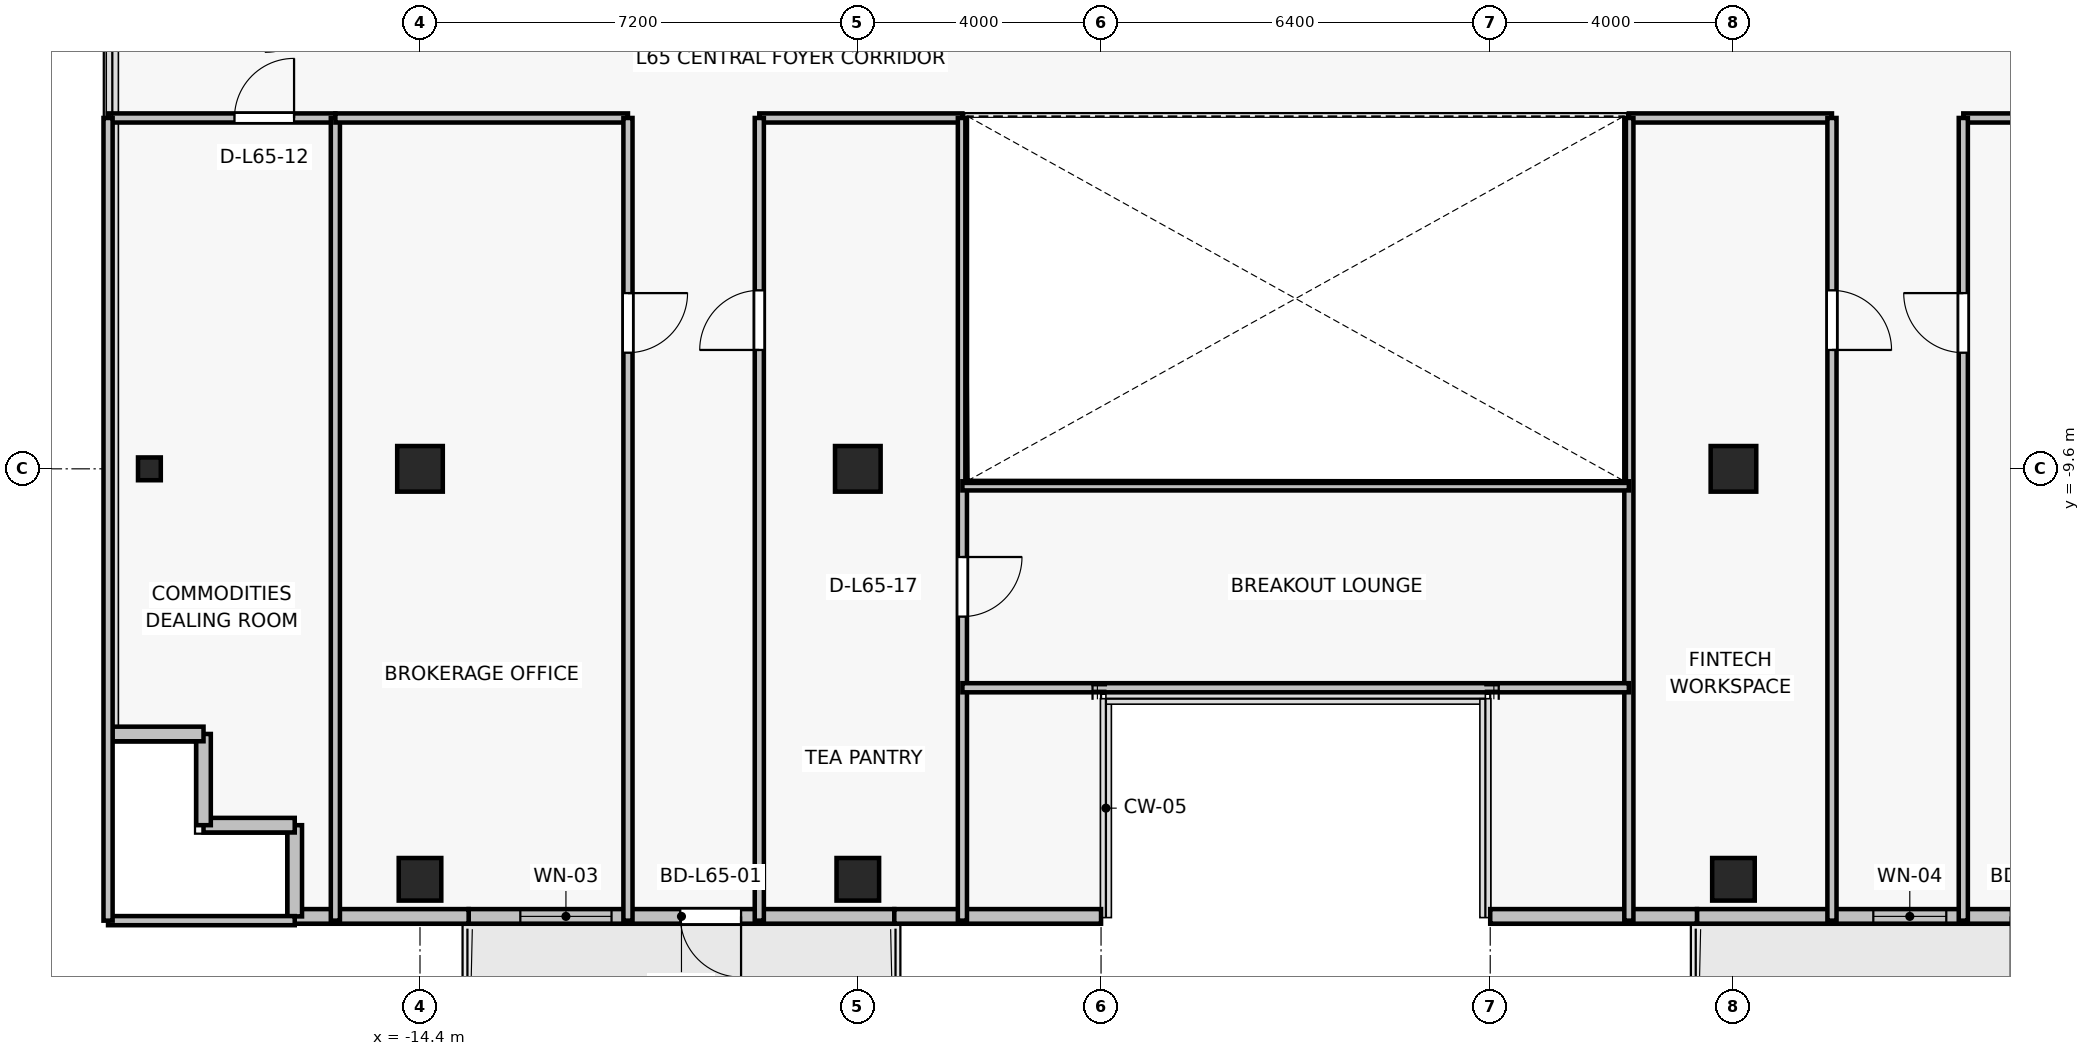
"""IFC4 building model, lengths in metres.
Left out: names, types, materials, properties, quantities, classifications, styles, units other than length and angle.
Written with IfcOpenShell. Run it as: python <this file> out.ifc"""

import sys

from ifc_helpers import new_model, si_unit, direction, frame, frame_2d, origin, origin_2d, place, context, subcontext, project, spatial, rectangle, i_section, extrude, source, transform, mapped, element, fill, save


model = new_model("IFC4")
c1 = context("Model", 3, precision=1e-05, world=origin(), true_north=direction((0.0, 1.0)))
c2 = subcontext(c1, "Body", "Model", "MODEL_VIEW")
j1 = project(units=[si_unit("LENGTHUNIT", "METRE"), si_unit("PLANEANGLEUNIT", "RADIAN")], contexts=[c1])
p1 = place(None, origin())
s1 = spatial("IfcSite", under=j1, at=p1, CompositionType="ELEMENT")
p2 = place(p1, origin())
s2 = spatial("IfcBuilding", under=s1, at=p2, CompositionType="ELEMENT")
p3 = place(p2, frame((0.0, 0.0, 232.0)))
s3 = spatial("IfcBuildingStorey", under=s2, at=p3, CompositionType="ELEMENT", Elevation=232.0)
for number, where, z_axis, x_axis in (
    (1, (-14.4, -9.6, 0.0), (0.0, 0.0, 1.0), (1.0, 0.0, 0.0)),
    (2, (-7.2, -9.6, 0.0), (0.0, 0.0, 1.0), (1.0, 0.0, 0.0)),
    (3, (7.2, -9.6, 0.0), (0.0, 0.0, 1.0), (1.0, 0.0, 0.0)),
):
    element("IfcColumn", number, at=place(p3, frame(where, z_axis=z_axis, x_axis=x_axis)), inside=s3, PredefinedType="COLUMN", context=c2, shape_type="SweptSolid", body=[
        extrude(rectangle(XDim=0.75, YDim=0.75, at=origin_2d()), origin(), (0.0, 0.0, 1.0), 3.3),
    ])
for number, where, z_axis, x_axis in (
    (4, (-14.4, -16.35, 0.0), (0.0, 0.0, 1.0), (1.0, 0.0, 0.0)),
    (5, (-7.2, -16.35, 0.0), (0.0, 0.0, 1.0), (1.0, 0.0, 0.0)),
    (6, (7.2, -16.35, 0.0), (0.0, 0.0, 1.0), (1.0, 0.0, 0.0)),
):
    element("IfcColumn", number, at=place(p3, frame(where, z_axis=z_axis, x_axis=x_axis)), inside=s3, PredefinedType="COLUMN", context=c2, shape_type="SweptSolid", body=[
        extrude(rectangle(XDim=0.7, YDim=0.7, at=origin_2d()), origin(), (0.0, 0.0, 1.0), 3.3),
    ])
p4 = place(p3, frame((-18.85, -9.6, 0.0), z_axis=(0.0, 0.0, 1.0), x_axis=(1.0, 0.0, 0.0)))
e7 = element("IfcColumn", 7, at=p4, inside=s3, PredefinedType="COLUMN", context=c2, shape_type="SweptSolid", body=[
    extrude(i_section(OverallWidth=0.375, OverallDepth=0.375, WebThickness=0.017, FlangeThickness=0.027, FilletRadius=0.015, at=origin_2d()), origin(), (0.0, 0.0, 1.0), 3.3),
])
p5 = place(p3, frame((-6.6, -16.96, 0.0), z_axis=(0.0, 0.0, 1.0), x_axis=(-1.0, 0.0, 0.0)))
e8 = element("IfcWall", 8, at=p5, inside=s3, PredefinedType="SOLIDWALL", context=c2, shape_type="SweptSolid", body=[
    extrude(rectangle(XDim=7.0, YDim=0.24, at=frame_2d((3.5, 0.0))), origin(), (0.0, 0.0, 1.0), 2.665),
])
p6 = place(p5, frame((2.52, 0.0, 0.0)))
e9 = element("IfcOpeningElement", 9, at=p6, cuts=e8, PredefinedType="OPENING", context=c2, shape_type="SweptSolid", body=[
    extrude(rectangle(XDim=1.0, YDim=2.2, at=frame_2d((0.5, 1.1))), frame((0.0, 0.13, 0.0), z_axis=(0.0, -1.0, 0.0), x_axis=(1.0, 0.0, 0.0)), (0.0, 0.0, 1.0), 0.26),
])
p7 = place(p5, frame((4.65, 0.0, 0.85)))
e10 = element("IfcOpeningElement", 10, at=p7, cuts=e8, PredefinedType="OPENING", context=c2, shape_type="SweptSolid", body=[
    extrude(rectangle(XDim=1.5, YDim=1.6, at=frame_2d((0.75, 0.8))), frame((0.0, 0.13, 0.0), z_axis=(0.0, -1.0, 0.0), x_axis=(1.0, 0.0, 0.0)), (0.0, 0.0, 1.0), 0.26),
])
p8 = place(p3, frame((13.6, -16.96, 0.0), z_axis=(0.0, 0.0, 1.0), x_axis=(-1.0, 0.0, 0.0)))
e11 = element("IfcWall", 11, at=p8, inside=s3, PredefinedType="SOLIDWALL", context=c2, shape_type="SweptSolid", body=[
    extrude(rectangle(XDim=7.0, YDim=0.24, at=frame_2d((3.5, 0.0))), origin(), (0.0, 0.0, 1.0), 2.665),
])
p9 = place(p8, frame((0.84, 0.0, 0.0)))
e12 = element("IfcOpeningElement", 12, at=p9, cuts=e11, PredefinedType="OPENING", context=c2, shape_type="SweptSolid", body=[
    extrude(rectangle(XDim=1.0, YDim=2.2, at=frame_2d((0.5, 1.1))), frame((0.0, 0.13, 0.0), z_axis=(0.0, -1.0, 0.0), x_axis=(1.0, 0.0, 0.0)), (0.0, 0.0, 1.0), 0.26),
])
p10 = place(p8, frame((2.9, 0.0, 0.85)))
e13 = element("IfcOpeningElement", 13, at=p10, cuts=e11, PredefinedType="OPENING", context=c2, shape_type="SweptSolid", body=[
    extrude(rectangle(XDim=1.2, YDim=1.5, at=frame_2d((0.6, 0.75))), frame((0.0, 0.13, 0.0), z_axis=(0.0, -1.0, 0.0), x_axis=(1.0, 0.0, 0.0)), (0.0, 0.0, 1.0), 0.26),
])
for number, where, z_axis, x_axis in (
    (14, (3.2, -16.96, 0.0), (0.0, 0.0, 1.0), (1.0, 0.0, 0.0)),
    (15, (-6.6, -16.96, 0.0), (0.0, 0.0, 1.0), (1.0, 0.0, 0.0)),
):
    element("IfcWall", number, at=place(p3, frame(where, z_axis=z_axis, x_axis=x_axis)), inside=s3, PredefinedType="SOLIDWALL", context=c2, shape_type="SweptSolid", body=[
        extrude(rectangle(XDim=3.4, YDim=0.24, at=frame_2d((1.7, 0.0))), origin(), (0.0, 0.0, 1.0), 3.075),
    ])
p11 = place(p3, frame((-16.46, -16.96, 0.0), z_axis=(0.0, 0.0, 1.0), x_axis=(1.0, 0.0, 0.0)))
e16 = element("IfcWall", 16, at=p11, inside=s3, PredefinedType="SOLIDWALL", context=c2, shape_type="SweptSolid", body=[
    extrude(rectangle(XDim=2.86, YDim=0.24, at=frame_2d((1.43, 0.0))), origin(), (0.0, 0.0, 1.0), 2.665),
])
for number, where, z_axis, x_axis in (
    (17, (-16.46, -15.46, 0.0), (0.0, 0.0, 1.0), (0.0, -1.0, 0.0)),
    (18, (-17.96, -15.46, 0.0), (0.0, 0.0, 1.0), (1.0, 0.0, 0.0)),
    (19, (-17.96, -13.96, 0.0), (0.0, 0.0, 1.0), (0.0, -1.0, 0.0)),
    (20, (-19.46, -13.96, 0.0), (0.0, 0.0, 1.0), (1.0, 0.0, 0.0)),
):
    element("IfcWall", number, at=place(p3, frame(where, z_axis=z_axis, x_axis=x_axis)), inside=s3, PredefinedType="SOLIDWALL", context=c2, shape_type="SweptSolid", body=[
        extrude(rectangle(XDim=1.5, YDim=0.24, at=frame_2d((0.75, 0.0))), origin(), (0.0, 0.0, 1.0), 3.075),
    ])
p12 = place(p3, frame((-16.46, -17.03, 0.0), z_axis=(0.0, 0.0, 1.0), x_axis=(-1.0, 0.0, 0.0)))
e21 = element("IfcWall", 21, at=p12, inside=s3, PredefinedType="PARTITIONING", context=c2, shape_type="SweptSolid", body=[
    extrude(rectangle(XDim=3.07, YDim=0.15, at=frame_2d((1.535, 0.0))), origin(), (0.0, 0.0, 1.0), 3.075),
])
p13 = place(p3, frame((-19.53, -3.83, 0.0), z_axis=(0.0, 0.0, 1.0), x_axis=(1.0, 0.0, 0.0)))
e22 = element("IfcWall", 22, at=p13, inside=s3, PredefinedType="PARTITIONING", context=c2, shape_type="SweptSolid", body=[
    extrude(rectangle(XDim=3.738, YDim=0.15, at=frame_2d((1.869, 0.0))), origin(), (0.0, 0.0, 1.0), 2.765),
])
p14 = place(p13, frame((2.079, 0.0, 0.0)))
e23 = element("IfcOpeningElement", 23, at=p14, cuts=e22, PredefinedType="OPENING", context=c2, shape_type="SweptSolid", body=[
    extrude(rectangle(XDim=0.98, YDim=2.15, at=frame_2d((0.49, 1.075))), frame((0.0, 0.085, 0.0), z_axis=(0.0, -1.0, 0.0), x_axis=(1.0, 0.0, 0.0)), (0.0, 0.0, 1.0), 0.17),
])
p15 = place(p3, frame((-19.53, -17.03, 0.0), z_axis=(0.0, 0.0, 1.0), x_axis=(0.0, 1.0, 0.0)))
e24 = element("IfcWall", 24, at=p15, inside=s3, PredefinedType="PARTITIONING", context=c2, shape_type="SweptSolid", body=[
    extrude(rectangle(XDim=13.2, YDim=0.15, at=frame_2d((6.6, 0.0))), origin(), (0.0, 0.0, 1.0), 2.665),
])
p16 = place(p3, frame((-15.792, -3.83, 0.0), z_axis=(0.0, 0.0, 1.0), x_axis=(0.0, -1.0, 0.0)))
e25 = element("IfcWall", 25, at=p16, inside=s3, PredefinedType="PARTITIONING", context=c2, shape_type="SweptSolid", body=[
    extrude(rectangle(XDim=13.2, YDim=0.15, at=frame_2d((6.6, 0.0))), origin(), (0.0, 0.0, 1.0), 2.615),
])
p17 = place(p3, frame((-15.792, -3.83, 0.0), z_axis=(0.0, 0.0, 1.0), x_axis=(1.0, 0.0, 0.0)))
e26 = element("IfcWall", 26, at=p17, inside=s3, PredefinedType="PARTITIONING", context=c2, shape_type="SweptSolid", body=[
    extrude(rectangle(XDim=4.812, YDim=0.15, at=frame_2d((2.406, 0.0))), origin(), (0.0, 0.0, 1.0), 2.615),
])
p18 = place(p3, frame((-10.98, -3.83, 0.0), z_axis=(0.0, 0.0, 1.0), x_axis=(0.0, -1.0, 0.0)))
e27 = element("IfcWall", 27, at=p18, inside=s3, PredefinedType="PARTITIONING", context=c2, shape_type="SweptSolid", body=[
    extrude(rectangle(XDim=13.2, YDim=0.15, at=frame_2d((6.6, 0.0))), origin(), (0.0, 0.0, 1.0), 2.615),
])
p19 = place(p18, frame((2.88, 0.0, 0.0)))
e28 = element("IfcOpeningElement", 28, at=p19, cuts=e27, PredefinedType="OPENING", context=c2, shape_type="SweptSolid", body=[
    extrude(rectangle(XDim=0.98, YDim=2.15, at=frame_2d((0.49, 1.075))), frame((0.0, 0.085, 0.0), z_axis=(0.0, -1.0, 0.0), x_axis=(1.0, 0.0, 0.0)), (0.0, 0.0, 1.0), 0.17),
])
p20 = place(p3, frame((10.98, -3.83, 0.0), z_axis=(0.0, 0.0, 1.0), x_axis=(1.0, 0.0, 0.0)))
e29 = element("IfcWall", 29, at=p20, inside=s3, PredefinedType="PARTITIONING", context=c2, shape_type="SweptSolid", body=[
    extrude(rectangle(XDim=12.55, YDim=0.15, at=frame_2d((6.275, 0.0))), origin(), (0.0, 0.0, 1.0), 2.615),
])
p21 = place(p3, frame((10.98, -17.03, 0.0), z_axis=(0.0, 0.0, 1.0), x_axis=(0.0, 1.0, 0.0)))
e30 = element("IfcWall", 30, at=p21, inside=s3, PredefinedType="PARTITIONING", context=c2, shape_type="SweptSolid", body=[
    extrude(rectangle(XDim=13.2, YDim=0.15, at=frame_2d((6.6, 0.0))), origin(), (0.0, 0.0, 1.0), 2.615),
])
p22 = place(p21, frame((9.34, 0.0, 0.0)))
e31 = element("IfcOpeningElement", 31, at=p22, cuts=e30, PredefinedType="OPENING", context=c2, shape_type="SweptSolid", body=[
    extrude(rectangle(XDim=0.98, YDim=2.15, at=frame_2d((0.49, 1.075))), frame((0.0, 0.085, 0.0), z_axis=(0.0, -1.0, 0.0), x_axis=(1.0, 0.0, 0.0)), (0.0, 0.0, 1.0), 0.17),
])
p23 = place(p3, frame((-8.82, -3.83, 0.0), z_axis=(0.0, 0.0, 1.0), x_axis=(1.0, 0.0, 0.0)))
e32 = element("IfcWall", 32, at=p23, inside=s3, PredefinedType="PARTITIONING", context=c2, shape_type="SweptSolid", body=[
    extrude(rectangle(XDim=3.34, YDim=0.15, at=frame_2d((1.67, 0.0))), origin(), (0.0, 0.0, 1.0), 2.615),
])
p24 = place(p3, frame((-8.82, -17.03, 0.0), z_axis=(0.0, 0.0, 1.0), x_axis=(0.0, 1.0, 0.0)))
e33 = element("IfcWall", 33, at=p24, inside=s3, PredefinedType="PARTITIONING", context=c2, shape_type="SweptSolid", body=[
    extrude(rectangle(XDim=13.2, YDim=0.15, at=frame_2d((6.6, 0.0))), origin(), (0.0, 0.0, 1.0), 2.615),
])
p25 = place(p24, frame((9.385, 0.0, 0.0)))
e34 = element("IfcOpeningElement", 34, at=p25, cuts=e33, PredefinedType="OPENING", context=c2, shape_type="SweptSolid", body=[
    extrude(rectangle(XDim=0.98, YDim=2.15, at=frame_2d((0.49, 1.075))), frame((0.0, 0.085, 0.0), z_axis=(0.0, -1.0, 0.0), x_axis=(1.0, 0.0, 0.0)), (0.0, 0.0, 1.0), 0.17),
])
p26 = place(p3, frame((-5.48, -3.83, 0.0), z_axis=(0.0, 0.0, 1.0), x_axis=(0.0, -1.0, 0.0)))
e35 = element("IfcWall", 35, at=p26, inside=s3, PredefinedType="PARTITIONING", context=c2, shape_type="SweptSolid", body=[
    extrude(rectangle(XDim=13.2, YDim=0.15, at=frame_2d((6.6, 0.0))), origin(), (0.0, 0.0, 1.0), 2.615),
])
p27 = place(p26, frame((7.22, 0.0, 0.0)))
e36 = element("IfcOpeningElement", 36, at=p27, cuts=e35, PredefinedType="OPENING", context=c2, shape_type="SweptSolid", body=[
    extrude(rectangle(XDim=0.98, YDim=2.15, at=frame_2d((0.49, 1.075))), frame((0.0, 0.085, 0.0), z_axis=(0.0, -1.0, 0.0), x_axis=(1.0, 0.0, 0.0)), (0.0, 0.0, 1.0), 0.17),
])
p28 = place(p3, frame((5.48, -3.83, 0.0), z_axis=(0.0, 0.0, 1.0), x_axis=(1.0, 0.0, 0.0)))
e37 = element("IfcWall", 37, at=p28, inside=s3, PredefinedType="PARTITIONING", context=c2, shape_type="SweptSolid", body=[
    extrude(rectangle(XDim=3.34, YDim=0.15, at=frame_2d((1.67, 0.0))), origin(), (0.0, 0.0, 1.0), 2.615),
])
p29 = place(p3, frame((5.48, -17.03, 0.0), z_axis=(0.0, 0.0, 1.0), x_axis=(0.0, 1.0, 0.0)))
e38 = element("IfcWall", 38, at=p29, inside=s3, PredefinedType="PARTITIONING", context=c2, shape_type="SweptSolid", body=[
    extrude(rectangle(XDim=13.2, YDim=0.15, at=frame_2d((6.6, 0.0))), origin(), (0.0, 0.0, 1.0), 2.615),
])
p30 = place(p3, frame((8.82, -3.83, 0.0), z_axis=(0.0, 0.0, 1.0), x_axis=(0.0, -1.0, 0.0)))
e39 = element("IfcWall", 39, at=p30, inside=s3, PredefinedType="PARTITIONING", context=c2, shape_type="SweptSolid", body=[
    extrude(rectangle(XDim=13.2, YDim=0.15, at=frame_2d((6.6, 0.0))), origin(), (0.0, 0.0, 1.0), 2.615),
])
p31 = place(p30, frame((2.835, 0.0, 0.0)))
e40 = element("IfcOpeningElement", 40, at=p31, cuts=e39, PredefinedType="OPENING", context=c2, shape_type="SweptSolid", body=[
    extrude(rectangle(XDim=0.98, YDim=2.15, at=frame_2d((0.49, 1.075))), frame((0.0, 0.085, 0.0), z_axis=(0.0, -1.0, 0.0), x_axis=(1.0, 0.0, 0.0)), (0.0, 0.0, 1.0), 0.17),
])
p32 = place(p3, frame((5.48, -13.2, 0.0), z_axis=(0.0, 0.0, 1.0), x_axis=(-1.0, 0.0, 0.0)))
e41 = element("IfcWall", 41, at=p32, inside=s3, PredefinedType="PARTITIONING", context=c2, shape_type="SweptSolid", body=[
    extrude(rectangle(XDim=10.96, YDim=0.15, at=frame_2d((5.48, 0.0))), origin(), (0.0, 0.0, 1.0), 2.765),
])
p33 = place(p3, frame((-5.48, -9.88, 0.0), z_axis=(0.0, 0.0, 1.0), x_axis=(1.0, 0.0, 0.0)))
e42 = element("IfcWall", 42, at=p33, inside=s3, PredefinedType="PARTITIONING", context=c2, shape_type="SweptSolid", body=[
    extrude(rectangle(XDim=10.96, YDim=0.15, at=frame_2d((5.48, 0.0))), origin(), (0.0, 0.0, 1.0), 2.615),
])
m1 = source(origin(), c2, "Body", "SweptSolid", [
    extrude(rectangle(XDim=1.0, YDim=2.2, at=frame_2d((0.5, 1.1))), frame((0.0, 0.025, 0.0), z_axis=(0.0, -1.0, 0.0), x_axis=(1.0, 0.0, 0.0)), (0.0, 0.0, 1.0), 0.05),
])
p34 = place(p6, origin())
e43 = element("IfcDoor", 43, at=p34, inside=s3, OperationType="SINGLE_SWING_LEFT", PredefinedType="DOOR", context=c2, shape_type="MappedRepresentation", body=[
    mapped(m1, transform((0.0, 0.0, 0.0), x_axis=(1.0, 0.0, 0.0), y_axis=(0.0, 1.0, 0.0), z_axis=(0.0, 0.0, 1.0), scale=1.0)),
])
fill(e9, e43)
m2 = source(origin(), c2, "Body", "SweptSolid", [
    extrude(rectangle(XDim=1.5, YDim=1.6, at=frame_2d((0.75, 0.8))), frame((0.0, 0.03, 0.0), z_axis=(0.0, -1.0, 0.0), x_axis=(1.0, 0.0, 0.0)), (0.0, 0.0, 1.0), 0.06),
])
p35 = place(p7, origin())
e44 = element("IfcWindow", 44, at=p35, inside=s3, PartitioningType="SINGLE_PANEL", PredefinedType="WINDOW", context=c2, shape_type="MappedRepresentation", body=[
    mapped(m2, transform((0.0, 0.0, 0.0), x_axis=(1.0, 0.0, 0.0), y_axis=(0.0, 1.0, 0.0), z_axis=(0.0, 0.0, 1.0), scale=1.0)),
])
fill(e10, e44)
m3 = source(origin(), c2, "Body", "SweptSolid", [
    extrude(rectangle(XDim=1.2, YDim=1.5, at=frame_2d((0.6, 0.75))), frame((0.0, 0.03, 0.0), z_axis=(0.0, -1.0, 0.0), x_axis=(1.0, 0.0, 0.0)), (0.0, 0.0, 1.0), 0.06),
])
p36 = place(p10, origin())
e45 = element("IfcWindow", 45, at=p36, inside=s3, PartitioningType="SINGLE_PANEL", PredefinedType="WINDOW", context=c2, shape_type="MappedRepresentation", body=[
    mapped(m3, transform((0.0, 0.0, 0.0), x_axis=(1.0, 0.0, 0.0), y_axis=(0.0, 1.0, 0.0), z_axis=(0.0, 0.0, 1.0), scale=1.0)),
])
fill(e13, e45)
m4 = source(origin(), c2, "Body", "SweptSolid", [
    extrude(rectangle(XDim=0.98, YDim=2.15, at=frame_2d((0.49, 1.075))), frame((0.0, 0.025, 0.0), z_axis=(0.0, -1.0, 0.0), x_axis=(1.0, 0.0, 0.0)), (0.0, 0.0, 1.0), 0.05),
])
p37 = place(p14, origin())
e46 = element("IfcDoor", 46, at=p37, inside=s3, OperationType="SINGLE_SWING_RIGHT", PredefinedType="DOOR", context=c2, shape_type="MappedRepresentation", body=[
    mapped(m4, transform((0.0, 0.0, 0.0), x_axis=(1.0, 0.0, 0.0), y_axis=(0.0, 1.0, 0.0), z_axis=(0.0, 0.0, 1.0), scale=1.0)),
])
fill(e23, e46)
p38 = place(p19, origin())
e47 = element("IfcDoor", 47, at=p38, inside=s3, OperationType="SINGLE_SWING_LEFT", PredefinedType="DOOR", context=c2, shape_type="MappedRepresentation", body=[
    mapped(m4, transform((0.0, 0.0, 0.0), x_axis=(1.0, 0.0, 0.0), y_axis=(0.0, 1.0, 0.0), z_axis=(0.0, 0.0, 1.0), scale=1.0)),
])
fill(e28, e47)
p39 = place(p22, origin())
e48 = element("IfcDoor", 48, at=p39, inside=s3, OperationType="SINGLE_SWING_RIGHT", PredefinedType="DOOR", context=c2, shape_type="MappedRepresentation", body=[
    mapped(m4, transform((0.0, 0.0, 0.0), x_axis=(1.0, 0.0, 0.0), y_axis=(0.0, 1.0, 0.0), z_axis=(0.0, 0.0, 1.0), scale=1.0)),
])
fill(e31, e48)
p40 = place(p25, origin())
e49 = element("IfcDoor", 49, at=p40, inside=s3, OperationType="SINGLE_SWING_LEFT", PredefinedType="DOOR", context=c2, shape_type="MappedRepresentation", body=[
    mapped(m4, transform((0.0, 0.0, 0.0), x_axis=(1.0, 0.0, 0.0), y_axis=(0.0, 1.0, 0.0), z_axis=(0.0, 0.0, 1.0), scale=1.0)),
])
fill(e34, e49)
p41 = place(p31, origin())
e50 = element("IfcDoor", 50, at=p41, inside=s3, OperationType="SINGLE_SWING_RIGHT", PredefinedType="DOOR", context=c2, shape_type="MappedRepresentation", body=[
    mapped(m4, transform((0.0, 0.0, 0.0), x_axis=(1.0, 0.0, 0.0), y_axis=(0.0, 1.0, 0.0), z_axis=(0.0, 0.0, 1.0), scale=1.0)),
])
fill(e40, e50)
p42 = place(p27, origin())
e51 = element("IfcDoor", 51, at=p42, inside=s3, OperationType="SINGLE_SWING_LEFT", PredefinedType="DOOR", context=c2, shape_type="MappedRepresentation", body=[
    mapped(m4, transform((0.0, 0.0, 0.0), x_axis=(1.0, 0.0, 0.0), y_axis=(0.0, 1.0, 0.0), z_axis=(0.0, 0.0, 1.0), scale=1.0)),
])
fill(e36, e51)
save(model, sys.argv[1])
